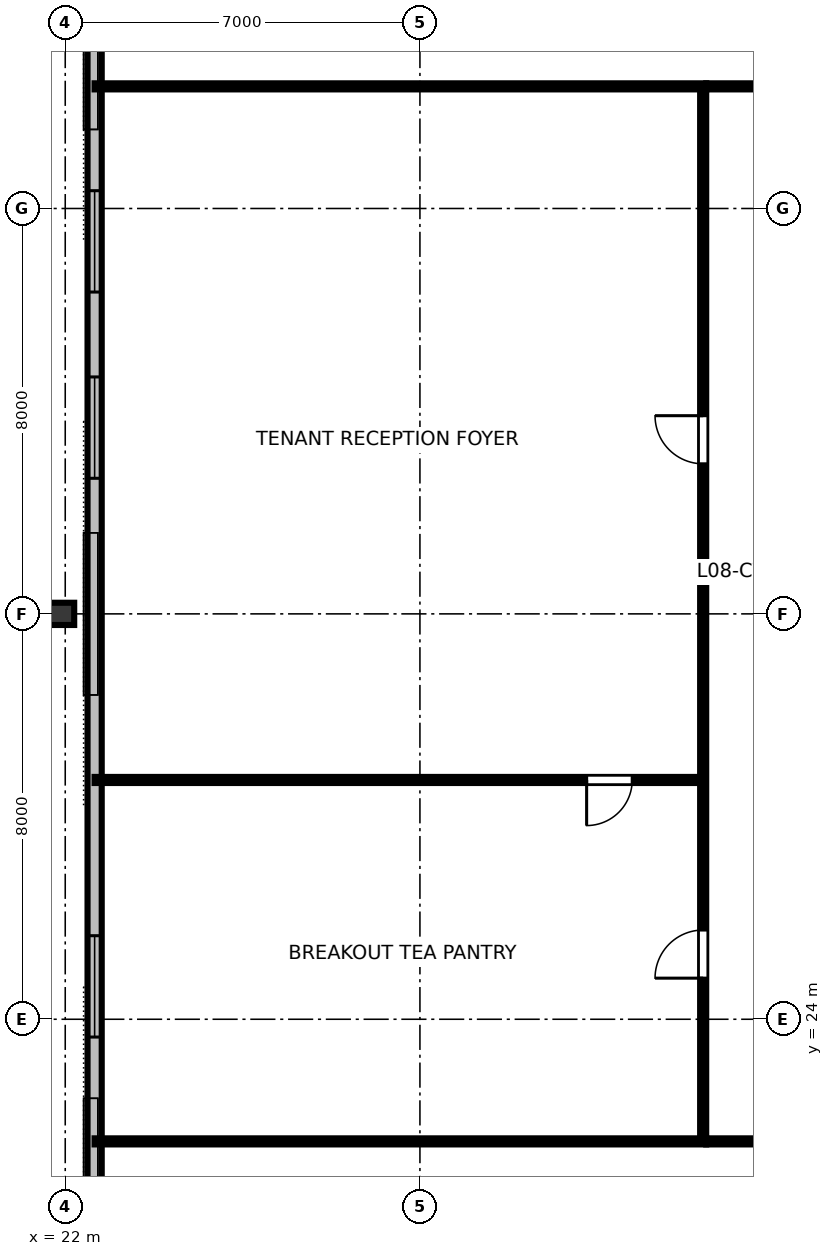
"""IFC4 building model, lengths in metres.
Left out: names, types, materials, properties, quantities, classifications, styles, units other than length and angle.
Written with IfcOpenShell. Run it as: python <this file> out.ifc"""

import sys

from ifc_helpers import new_model, si_unit, direction, frame, frame_2d, origin, origin_2d, place, context, subcontext, project, spatial, rectangle, i_section, extrude, element, fill, save


model = new_model("IFC4")
c1 = context("Model", 3, precision=1e-05, world=origin(), true_north=direction((0.0, 1.0)))
c2 = subcontext(c1, "Body", "Model", "MODEL_VIEW")
j1 = project(units=[si_unit("LENGTHUNIT", "METRE"), si_unit("PLANEANGLEUNIT", "RADIAN")], contexts=[c1])
p1 = place(None, origin())
s1 = spatial("IfcSite", under=j1, at=p1, CompositionType="ELEMENT")
p2 = place(p1, origin())
s2 = spatial("IfcBuilding", under=s1, at=p2, CompositionType="ELEMENT")
p3 = place(p2, frame((0.0, 0.0, 35.2)))
s3 = spatial("IfcBuildingStorey", under=s2, at=p3, CompositionType="ELEMENT", Elevation=35.2)
p4 = place(p3, frame((21.92, 32.0, 0.0), z_axis=(-0.11045690633, 0.0, 0.993880914317), x_axis=(0.993880914317, 0.0, 0.11045690633)))
e1 = element("IfcColumn", 1, at=p4, inside=s3, PredefinedType="COLUMN", context=c2, shape_type="SweptSolid", body=[
    extrude(i_section(OverallWidth=0.439, OverallDepth=0.514, WebThickness=0.06, FlangeThickness=0.097, FilletRadius=0.025, at=origin_2d()), origin(), (0.0, 0.0, 1.0), 3.167),
])
p5 = place(p3, frame((22.58, 49.64, 0.0), z_axis=(0.0, 0.0, 1.0), x_axis=(0.0, -1.0, 0.0)))
e2 = element("IfcWall", 2, at=p5, inside=s3, PredefinedType="STANDARD", context=c2, shape_type="SweptSolid", body=[
    extrude(rectangle(XDim=35.28, YDim=0.28, at=frame_2d((17.64, 0.0))), origin(), (0.0, 0.0, 1.0), 3.15),
])
p6 = place(p5, frame((1.938, 0.0, 0.8)))
e3 = element("IfcOpeningElement", 3, at=p6, cuts=e2, PredefinedType="OPENING", context=c2, shape_type="SweptSolid", body=[
    extrude(rectangle(XDim=2.0, YDim=1.95, at=frame_2d((1.0, 0.975))), frame((0.0, 0.15, 0.0), z_axis=(0.0, -1.0, 0.0), x_axis=(1.0, 0.0, 0.0)), (0.0, 0.0, 1.0), 0.3),
])
p7 = place(p5, frame((9.289, 0.0, 0.8)))
e4 = element("IfcOpeningElement", 4, at=p7, cuts=e2, PredefinedType="OPENING", context=c2, shape_type="SweptSolid", body=[
    extrude(rectangle(XDim=2.0, YDim=1.95, at=frame_2d((1.0, 0.975))), frame((0.0, 0.15, 0.0), z_axis=(0.0, -1.0, 0.0), x_axis=(1.0, 0.0, 0.0)), (0.0, 0.0, 1.0), 0.3),
])
p8 = place(p5, frame((12.964, 0.0, 0.8)))
e5 = element("IfcOpeningElement", 5, at=p8, cuts=e2, PredefinedType="OPENING", context=c2, shape_type="SweptSolid", body=[
    extrude(rectangle(XDim=2.0, YDim=1.95, at=frame_2d((1.0, 0.975))), frame((0.0, 0.15, 0.0), z_axis=(0.0, -1.0, 0.0), x_axis=(1.0, 0.0, 0.0)), (0.0, 0.0, 1.0), 0.3),
])
p9 = place(p5, frame((23.991, 0.0, 0.8)))
e6 = element("IfcOpeningElement", 6, at=p9, cuts=e2, PredefinedType="OPENING", context=c2, shape_type="SweptSolid", body=[
    extrude(rectangle(XDim=2.0, YDim=1.95, at=frame_2d((1.0, 0.975))), frame((0.0, 0.15, 0.0), z_axis=(0.0, -1.0, 0.0), x_axis=(1.0, 0.0, 0.0)), (0.0, 0.0, 1.0), 0.3),
])
p10 = place(p5, frame((31.342, 0.0, 0.8)))
e7 = element("IfcOpeningElement", 7, at=p10, cuts=e2, PredefinedType="OPENING", context=c2, shape_type="SweptSolid", body=[
    extrude(rectangle(XDim=2.0, YDim=1.95, at=frame_2d((1.0, 0.975))), frame((0.0, 0.15, 0.0), z_axis=(0.0, -1.0, 0.0), x_axis=(1.0, 0.0, 0.0)), (0.0, 0.0, 1.0), 0.3),
])
p11 = place(p3, frame((34.65, 21.59, 0.0), z_axis=(0.0, 0.0, 1.0), x_axis=(1.0, 0.0, 0.0)))
e8 = element("IfcWall", 8, at=p11, inside=s3, PredefinedType="PARTITIONING", context=c2, shape_type="SweptSolid", body=[
    extrude(rectangle(XDim=22.7, YDim=0.12, at=frame_2d((11.35, 0.0))), origin(), (0.0, 0.0, 1.0), 2.43),
])
p12 = place(p11, frame((2.224, 0.0, 0.0)))
e9 = element("IfcOpeningElement", 9, at=p12, cuts=e8, PredefinedType="OPENING", context=c2, shape_type="SweptSolid", body=[
    extrude(rectangle(XDim=0.95, YDim=2.15, at=frame_2d((0.475, 1.075))), frame((0.0, 0.07, 0.0), z_axis=(0.0, -1.0, 0.0), x_axis=(1.0, 0.0, 0.0)), (0.0, 0.0, 1.0), 0.14),
])
p13 = place(p11, frame((9.381, 0.0, 0.0)))
e10 = element("IfcOpeningElement", 10, at=p13, cuts=e8, PredefinedType="OPENING", context=c2, shape_type="SweptSolid", body=[
    extrude(rectangle(XDim=0.95, YDim=2.15, at=frame_2d((0.475, 1.075))), frame((0.0, 0.07, 0.0), z_axis=(0.0, -1.0, 0.0), x_axis=(1.0, 0.0, 0.0)), (0.0, 0.0, 1.0), 0.14),
])
p14 = place(p11, frame((18.031, 0.0, 0.0)))
e11 = element("IfcOpeningElement", 11, at=p14, cuts=e8, PredefinedType="OPENING", context=c2, shape_type="SweptSolid", body=[
    extrude(rectangle(XDim=0.95, YDim=2.15, at=frame_2d((0.475, 1.075))), frame((0.0, 0.07, 0.0), z_axis=(0.0, -1.0, 0.0), x_axis=(1.0, 0.0, 0.0)), (0.0, 0.0, 1.0), 0.14),
])
p15 = place(p3, frame((34.65, 42.41, 0.0), z_axis=(0.0, 0.0, 1.0), x_axis=(1.0, 0.0, 0.0)))
e12 = element("IfcWall", 12, at=p15, inside=s3, PredefinedType="PARTITIONING", context=c2, shape_type="SweptSolid", body=[
    extrude(rectangle(XDim=22.7, YDim=0.12, at=frame_2d((11.35, 0.0))), origin(), (0.0, 0.0, 1.0), 2.43),
])
p16 = place(p15, frame((3.981, 0.0, 0.0)))
e13 = element("IfcOpeningElement", 13, at=p16, cuts=e12, PredefinedType="OPENING", context=c2, shape_type="SweptSolid", body=[
    extrude(rectangle(XDim=0.95, YDim=2.15, at=frame_2d((0.475, 1.075))), frame((0.0, 0.07, 0.0), z_axis=(0.0, -1.0, 0.0), x_axis=(1.0, 0.0, 0.0)), (0.0, 0.0, 1.0), 0.14),
])
p17 = place(p15, frame((10.508, 0.0, 0.0)))
e14 = element("IfcOpeningElement", 14, at=p17, cuts=e12, PredefinedType="OPENING", context=c2, shape_type="SweptSolid", body=[
    extrude(rectangle(XDim=0.95, YDim=2.15, at=frame_2d((0.475, 1.075))), frame((0.0, 0.07, 0.0), z_axis=(0.0, -1.0, 0.0), x_axis=(1.0, 0.0, 0.0)), (0.0, 0.0, 1.0), 0.14),
])
p18 = place(p15, frame((17.402, 0.0, 0.0)))
e15 = element("IfcOpeningElement", 15, at=p18, cuts=e12, PredefinedType="OPENING", context=c2, shape_type="SweptSolid", body=[
    extrude(rectangle(XDim=0.95, YDim=2.15, at=frame_2d((0.475, 1.075))), frame((0.0, 0.07, 0.0), z_axis=(0.0, -1.0, 0.0), x_axis=(1.0, 0.0, 0.0)), (0.0, 0.0, 1.0), 0.14),
])
p19 = place(p3, frame((34.59, 28.722, 0.0), z_axis=(0.0, 0.0, 1.0), x_axis=(-1.0, 0.0, 0.0)))
e16 = element("IfcWall", 16, at=p19, inside=s3, PredefinedType="PARTITIONING", context=c2, shape_type="SweptSolid", body=[
    extrude(rectangle(XDim=12.01, YDim=0.12, at=frame_2d((6.005, 0.0))), origin(), (0.0, 0.0, 1.0), 2.43),
])
p20 = place(p19, frame((1.4, 0.0, 0.0)))
e17 = element("IfcOpeningElement", 17, at=p20, cuts=e16, PredefinedType="OPENING", context=c2, shape_type="SweptSolid", body=[
    extrude(rectangle(XDim=0.9, YDim=2.15, at=frame_2d((0.45, 1.075))), frame((0.0, 0.07, 0.0), z_axis=(0.0, -1.0, 0.0), x_axis=(1.0, 0.0, 0.0)), (0.0, 0.0, 1.0), 0.14),
])
p21 = place(p3, frame((34.59, 21.65, 0.0), z_axis=(0.0, 0.0, 1.0), x_axis=(0.0, 1.0, 0.0)))
e18 = element("IfcWall", 18, at=p21, inside=s3, PredefinedType="PARTITIONING", context=c2, shape_type="SweptSolid", body=[
    extrude(rectangle(XDim=20.7, YDim=0.12, at=frame_2d((10.35, 0.0))), origin(), (0.0, 0.0, 1.0), 2.43),
])
p22 = place(p21, frame((3.161, 0.0, 0.0)))
e19 = element("IfcOpeningElement", 19, at=p22, cuts=e18, PredefinedType="OPENING", context=c2, shape_type="SweptSolid", body=[
    extrude(rectangle(XDim=0.95, YDim=2.15, at=frame_2d((0.475, 1.075))), frame((0.0, 0.07, 0.0), z_axis=(0.0, -1.0, 0.0), x_axis=(1.0, 0.0, 0.0)), (0.0, 0.0, 1.0), 0.14),
])
p23 = place(p21, frame((13.311, 0.0, 0.0)))
e20 = element("IfcOpeningElement", 20, at=p23, cuts=e18, PredefinedType="OPENING", context=c2, shape_type="SweptSolid", body=[
    extrude(rectangle(XDim=0.95, YDim=2.15, at=frame_2d((0.475, 1.075))), frame((0.0, 0.07, 0.0), z_axis=(0.0, -1.0, 0.0), x_axis=(1.0, 0.0, 0.0)), (0.0, 0.0, 1.0), 0.14),
])
for number, where, z_axis, x_axis in (
    (21, (34.65, 21.59, 0.0), (0.0, 0.0, 1.0), (-1.0, 0.0, 0.0)),
    (22, (34.65, 42.41, 0.0), (0.0, 0.0, 1.0), (-1.0, 0.0, 0.0)),
):
    element("IfcWall", number, at=place(p3, frame(where, z_axis=z_axis, x_axis=x_axis)), inside=s3, PredefinedType="PARTITIONING", context=c2, shape_type="SweptSolid", body=[
        extrude(rectangle(XDim=12.07, YDim=0.12, at=frame_2d((6.035, 0.0))), origin(), (0.0, 0.0, 1.0), 2.43),
    ])
p24 = place(p7, origin())
e23 = element("IfcWindow", 23, at=p24, inside=s3, PartitioningType="SINGLE_PANEL", PredefinedType="WINDOW", context=c2, shape_type="SweptSolid", body=[
    extrude(rectangle(XDim=2.0, YDim=1.95, at=frame_2d((1.0, 0.975))), frame((0.0, 0.03, 0.0), z_axis=(0.0, -1.0, 0.0), x_axis=(1.0, 0.0, 0.0)), (0.0, 0.0, 1.0), 0.06),
])
fill(e4, e23)
p25 = place(p8, origin())
e24 = element("IfcWindow", 24, at=p25, inside=s3, PartitioningType="SINGLE_PANEL", PredefinedType="WINDOW", context=c2, shape_type="SweptSolid", body=[
    extrude(rectangle(XDim=2.0, YDim=1.95, at=frame_2d((1.0, 0.975))), frame((0.0, 0.03, 0.0), z_axis=(0.0, -1.0, 0.0), x_axis=(1.0, 0.0, 0.0)), (0.0, 0.0, 1.0), 0.06),
])
fill(e5, e24)
p26 = place(p9, origin())
e25 = element("IfcWindow", 25, at=p26, inside=s3, PartitioningType="SINGLE_PANEL", PredefinedType="WINDOW", context=c2, shape_type="SweptSolid", body=[
    extrude(rectangle(XDim=2.0, YDim=1.95, at=frame_2d((1.0, 0.975))), frame((0.0, 0.03, 0.0), z_axis=(0.0, -1.0, 0.0), x_axis=(1.0, 0.0, 0.0)), (0.0, 0.0, 1.0), 0.06),
])
fill(e6, e25)
p27 = place(p20, origin())
e26 = element("IfcDoor", 26, at=p27, inside=s3, OperationType="SINGLE_SWING_RIGHT", PredefinedType="DOOR", context=c2, shape_type="SweptSolid", body=[
    extrude(rectangle(XDim=0.9, YDim=2.15, at=frame_2d((0.45, 1.075))), frame((0.0, 0.025, 0.0), z_axis=(0.0, -1.0, 0.0), x_axis=(1.0, 0.0, 0.0)), (0.0, 0.0, 1.0), 0.05),
])
fill(e17, e26)
p28 = place(p22, origin())
e27 = element("IfcDoor", 27, at=p28, inside=s3, OperationType="SINGLE_SWING_LEFT", PredefinedType="DOOR", context=c2, shape_type="SweptSolid", body=[
    extrude(rectangle(XDim=0.95, YDim=2.15, at=frame_2d((0.475, 1.075))), frame((0.0, 0.025, 0.0), z_axis=(0.0, -1.0, 0.0), x_axis=(1.0, 0.0, 0.0)), (0.0, 0.0, 1.0), 0.05),
])
fill(e19, e27)
p29 = place(p23, origin())
e28 = element("IfcDoor", 28, at=p29, inside=s3, OperationType="SINGLE_SWING_RIGHT", PredefinedType="DOOR", context=c2, shape_type="SweptSolid", body=[
    extrude(rectangle(XDim=0.95, YDim=2.15, at=frame_2d((0.475, 1.075))), frame((0.0, 0.025, 0.0), z_axis=(0.0, -1.0, 0.0), x_axis=(1.0, 0.0, 0.0)), (0.0, 0.0, 1.0), 0.05),
])
fill(e20, e28)
save(model, sys.argv[1])
